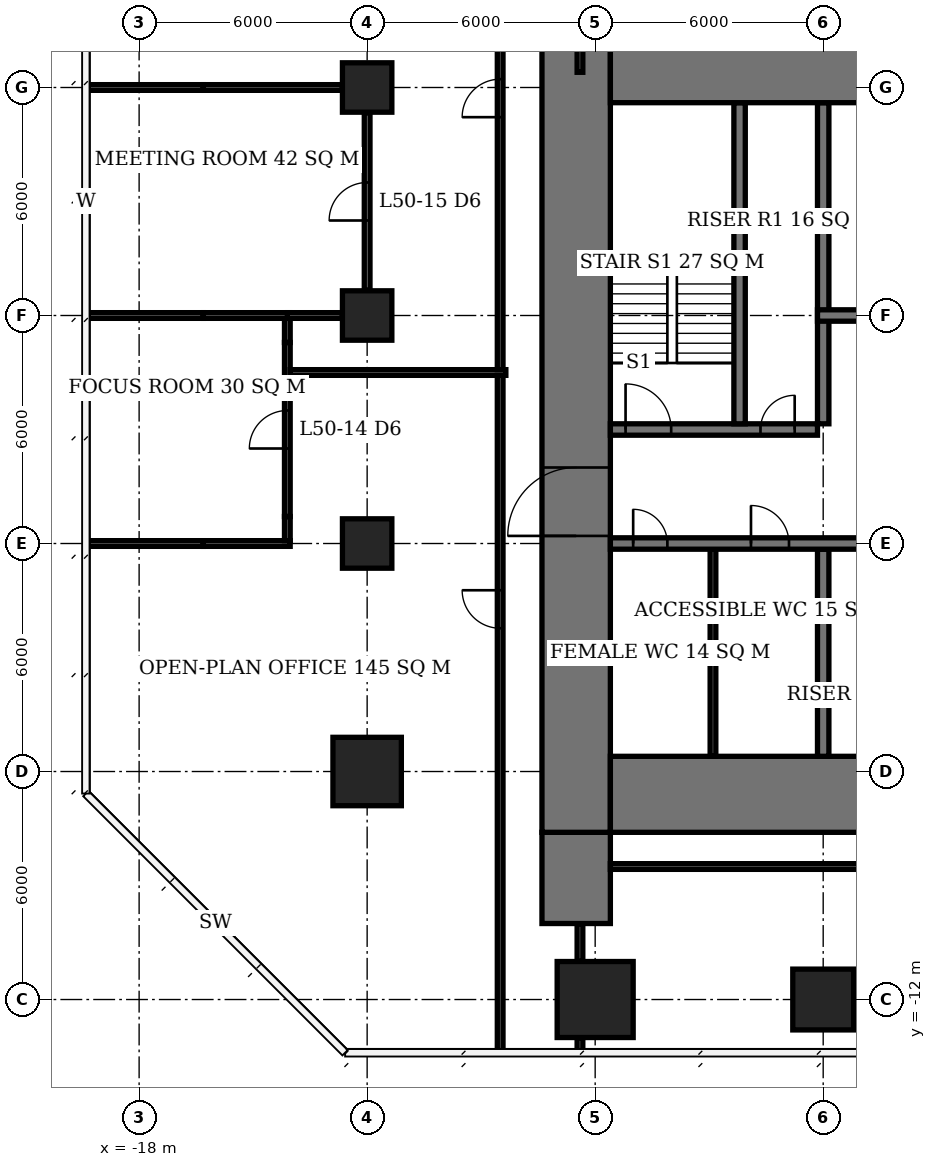
"""IFC4 building model, lengths in metres.
Left out: names, types, materials, properties, quantities, classifications, styles, units other than length and angle.
Written with IfcOpenShell. Run it as: python <this file> out.ifc"""

import sys

from ifc_helpers import new_model, si_unit, direction, frame, frame_2d, origin, origin_2d, place, context, subcontext, project, spatial, rectangle, extrude, element, fill, save


model = new_model("IFC4")
c1 = context("Model", 3, precision=1e-05, world=origin(), true_north=direction((0.0, 1.0)))
c2 = subcontext(c1, "Body", "Model", "MODEL_VIEW")
j1 = project(units=[si_unit("LENGTHUNIT", "METRE"), si_unit("PLANEANGLEUNIT", "RADIAN")], contexts=[c1])
p1 = place(None, origin())
s1 = spatial("IfcSite", under=j1, at=p1, CompositionType="ELEMENT")
p2 = place(p1, origin())
s2 = spatial("IfcBuilding", under=s1, at=p2, CompositionType="ELEMENT")
p3 = place(p2, frame((0.0, 0.0, 204.5)))
s3 = spatial("IfcBuildingStorey", under=s2, at=p3, CompositionType="ELEMENT", Elevation=204.5)
p4 = place(p3, frame((-12.0, -6.0, 0.0), z_axis=(0.0, 0.0, 1.0), x_axis=(1.0, 0.0, 0.0)))
e1 = element("IfcColumn", 1, at=p4, inside=s3, PredefinedType="COLUMN", context=c2, shape_type="SweptSolid", body=[
    extrude(rectangle(XDim=1.8, YDim=1.8, at=origin_2d()), origin(), (0.0, 0.0, 1.0), 3.9),
])
for number, where, z_axis, x_axis in (
    (2, (-12.0, 0.0, 0.0), (0.0, 0.0, 1.0), (1.0, 0.0, 0.0)),
    (3, (-12.0, 6.0, 0.0), (0.0, 0.0, 1.0), (1.0, 0.0, 0.0)),
    (4, (-12.0, 12.0, 0.0), (0.0, 0.0, 1.0), (1.0, 0.0, 0.0)),
):
    element("IfcColumn", number, at=place(p3, frame(where, z_axis=z_axis, x_axis=x_axis)), inside=s3, PredefinedType="COLUMN", context=c2, shape_type="SweptSolid", body=[
        extrude(rectangle(XDim=1.3, YDim=1.3, at=origin_2d()), origin(), (0.0, 0.0, 1.0), 3.9),
    ])
p5 = place(p3, frame((-6.0, -12.0, 0.0), z_axis=(0.0, 0.0, 1.0), x_axis=(1.0, 0.0, 0.0)))
e5 = element("IfcColumn", 5, at=p5, inside=s3, PredefinedType="COLUMN", context=c2, shape_type="SweptSolid", body=[
    extrude(rectangle(XDim=2.0, YDim=2.0, at=origin_2d()), origin(), (0.0, 0.0, 1.0), 3.9),
])
p6 = place(p3, frame((0.0, -12.0, 0.0), z_axis=(0.0, 0.0, 1.0), x_axis=(1.0, 0.0, 0.0)))
e6 = element("IfcColumn", 6, at=p6, inside=s3, PredefinedType="COLUMN", context=c2, shape_type="SweptSolid", body=[
    extrude(rectangle(XDim=1.6, YDim=1.6, at=origin_2d()), origin(), (0.0, 0.0, 1.0), 3.9),
])
for number, where, z_axis, x_axis in (
    (7, (-5.6, -6.6, 0.0), (0.0, 0.0, 1.0), (1.0, 0.0, 0.0)),
    (8, (-5.6, 12.6, 0.0), (0.0, 0.0, 1.0), (1.0, 0.0, 0.0)),
):
    element("IfcWall", number, at=place(p3, frame(where, z_axis=z_axis, x_axis=x_axis)), inside=s3, PredefinedType="SHEAR", context=c2, shape_type="SweptSolid", body=[
        extrude(rectangle(XDim=23.2, YDim=2.0, at=frame_2d((11.6, 0.0))), origin(), (0.0, 0.0, 1.0), 3.9),
    ])
p7 = place(p3, frame((-6.5, -7.6, 0.0), z_axis=(0.0, 0.0, 1.0), x_axis=(0.0, 1.0, 0.0)))
e9 = element("IfcWall", 9, at=p7, inside=s3, PredefinedType="SHEAR", context=c2, shape_type="SweptSolid", body=[
    extrude(rectangle(XDim=21.2, YDim=1.8, at=frame_2d((10.6, 0.0))), origin(), (0.0, 0.0, 1.0), 3.9),
])
p8 = place(p7, frame((7.8, 0.0, 0.0)))
e10 = element("IfcOpeningElement", 10, at=p8, cuts=e9, PredefinedType="OPENING", context=c2, shape_type="SweptSolid", body=[
    extrude(rectangle(XDim=1.8, YDim=2.4, at=frame_2d((0.9, 1.2))), frame((0.0, 0.91, 0.0), z_axis=(0.0, -1.0, 0.0), x_axis=(1.0, 0.0, 0.0)), (0.0, 0.0, 1.0), 1.82),
])
p9 = place(p3, frame((-6.5, -10.0, 0.0), z_axis=(0.0, 0.0, 1.0), x_axis=(0.0, 1.0, 0.0)))
e11 = element("IfcWall", 11, at=p9, inside=s3, PredefinedType="SHEAR", context=c2, shape_type="SweptSolid", body=[
    extrude(rectangle(XDim=2.4, YDim=1.8, at=frame_2d((1.2, 0.0))), origin(), (0.0, 0.0, 1.0), 3.9),
])
p10 = place(p3, frame((-5.6, 0.0, 0.0), z_axis=(0.0, 0.0, 1.0), x_axis=(1.0, 0.0, 0.0)))
e12 = element("IfcWall", 12, at=p10, inside=s3, PredefinedType="SHEAR", context=c2, shape_type="SweptSolid", body=[
    extrude(rectangle(XDim=17.75, YDim=0.3, at=frame_2d((8.875, 0.0))), origin(), (0.0, 0.0, 1.0), 3.9),
])
p11 = place(p10, frame((0.6, 0.0, 0.0)))
e13 = element("IfcOpeningElement", 13, at=p11, cuts=e12, PredefinedType="OPENING", context=c2, shape_type="SweptSolid", body=[
    extrude(rectangle(XDim=0.9, YDim=2.1, at=frame_2d((0.45, 1.05))), frame((0.0, 0.16, 0.0), z_axis=(0.0, -1.0, 0.0), x_axis=(1.0, 0.0, 0.0)), (0.0, 0.0, 1.0), 0.32),
])
p12 = place(p10, frame((3.7, 0.0, 0.0)))
e14 = element("IfcOpeningElement", 14, at=p12, cuts=e12, PredefinedType="OPENING", context=c2, shape_type="SweptSolid", body=[
    extrude(rectangle(XDim=1.0, YDim=2.1, at=frame_2d((0.5, 1.05))), frame((0.0, 0.16, 0.0), z_axis=(0.0, -1.0, 0.0), x_axis=(1.0, 0.0, 0.0)), (0.0, 0.0, 1.0), 0.32),
])
p13 = place(p10, frame((9.6, 0.0, 0.0)))
e15 = element("IfcOpeningElement", 15, at=p13, cuts=e12, PredefinedType="OPENING", context=c2, shape_type="SweptSolid", body=[
    extrude(rectangle(XDim=1.0, YDim=2.1, at=frame_2d((0.5, 1.05))), frame((0.0, 0.16, 0.0), z_axis=(0.0, -1.0, 0.0), x_axis=(1.0, 0.0, 0.0)), (0.0, 0.0, 1.0), 0.32),
])
p14 = place(p10, frame((12.55, 0.0, 0.0)))
e16 = element("IfcOpeningElement", 16, at=p14, cuts=e12, PredefinedType="OPENING", context=c2, shape_type="SweptSolid", body=[
    extrude(rectangle(XDim=1.1, YDim=2.1, at=frame_2d((0.55, 1.05))), frame((0.0, 0.16, 0.0), z_axis=(0.0, -1.0, 0.0), x_axis=(1.0, 0.0, 0.0)), (0.0, 0.0, 1.0), 0.32),
])
p15 = place(p10, frame((15.55, 0.0, 0.0)))
e17 = element("IfcOpeningElement", 17, at=p15, cuts=e12, PredefinedType="OPENING", context=c2, shape_type="SweptSolid", body=[
    extrude(rectangle(XDim=1.1, YDim=2.1, at=frame_2d((0.55, 1.05))), frame((0.0, 0.16, 0.0), z_axis=(0.0, -1.0, 0.0), x_axis=(1.0, 0.0, 0.0)), (0.0, 0.0, 1.0), 0.32),
])
p16 = place(p3, frame((-5.6, 3.0, 0.0), z_axis=(0.0, 0.0, 1.0), x_axis=(1.0, 0.0, 0.0)))
e18 = element("IfcWall", 18, at=p16, inside=s3, PredefinedType="SHEAR", context=c2, shape_type="SweptSolid", body=[
    extrude(rectangle(XDim=5.45, YDim=0.3, at=frame_2d((2.725, 0.0))), origin(), (0.0, 0.0, 1.0), 3.9),
])
p17 = place(p16, frame((0.4, 0.0, 0.0)))
e19 = element("IfcOpeningElement", 19, at=p17, cuts=e18, PredefinedType="OPENING", context=c2, shape_type="SweptSolid", body=[
    extrude(rectangle(XDim=1.2, YDim=2.1, at=frame_2d((0.6, 1.05))), frame((0.0, 0.16, 0.0), z_axis=(0.0, -1.0, 0.0), x_axis=(1.0, 0.0, 0.0)), (0.0, 0.0, 1.0), 0.32),
])
p18 = place(p16, frame((3.95, 0.0, 0.0)))
e20 = element("IfcOpeningElement", 20, at=p18, cuts=e18, PredefinedType="OPENING", context=c2, shape_type="SweptSolid", body=[
    extrude(rectangle(XDim=0.9, YDim=2.1, at=frame_2d((0.45, 1.05))), frame((0.0, 0.16, 0.0), z_axis=(0.0, -1.0, 0.0), x_axis=(1.0, 0.0, 0.0)), (0.0, 0.0, 1.0), 0.32),
])
p19 = place(p3, frame((-0.15, 6.0, 0.0), z_axis=(0.0, 0.0, 1.0), x_axis=(1.0, 0.0, 0.0)))
e21 = element("IfcWall", 21, at=p19, inside=s3, PredefinedType="SHEAR", context=c2, shape_type="SweptSolid", body=[
    extrude(rectangle(XDim=17.75, YDim=0.3, at=frame_2d((8.875, 0.0))), origin(), (0.0, 0.0, 1.0), 3.9),
])
p20 = place(p19, frame((13.15, 0.0, 0.0)))
e22 = element("IfcOpeningElement", 22, at=p20, cuts=e21, PredefinedType="OPENING", context=c2, shape_type="SweptSolid", body=[
    extrude(rectangle(XDim=0.9, YDim=2.1, at=frame_2d((0.45, 1.05))), frame((0.0, 0.16, 0.0), z_axis=(0.0, -1.0, 0.0), x_axis=(1.0, 0.0, 0.0)), (0.0, 0.0, 1.0), 0.32),
])
p21 = place(p19, frame((7.25, 0.0, 0.0)))
e23 = element("IfcOpeningElement", 23, at=p21, cuts=e21, PredefinedType="OPENING", context=c2, shape_type="SweptSolid", body=[
    extrude(rectangle(XDim=1.0, YDim=2.1, at=frame_2d((0.5, 1.05))), frame((0.0, 0.16, 0.0), z_axis=(0.0, -1.0, 0.0), x_axis=(1.0, 0.0, 0.0)), (0.0, 0.0, 1.0), 0.32),
])
p22 = place(p19, frame((1.1, 0.0, 0.0)))
e24 = element("IfcOpeningElement", 24, at=p22, cuts=e21, PredefinedType="OPENING", context=c2, shape_type="SweptSolid", body=[
    extrude(rectangle(XDim=1.1, YDim=2.1, at=frame_2d((0.55, 1.05))), frame((0.0, 0.16, 0.0), z_axis=(0.0, -1.0, 0.0), x_axis=(1.0, 0.0, 0.0)), (0.0, 0.0, 1.0), 0.32),
])
p23 = place(p19, frame((4.1, 0.0, 0.0)))
e25 = element("IfcOpeningElement", 25, at=p23, cuts=e21, PredefinedType="OPENING", context=c2, shape_type="SweptSolid", body=[
    extrude(rectangle(XDim=1.1, YDim=2.1, at=frame_2d((0.55, 1.05))), frame((0.0, 0.16, 0.0), z_axis=(0.0, -1.0, 0.0), x_axis=(1.0, 0.0, 0.0)), (0.0, 0.0, 1.0), 0.32),
])
p24 = place(p3, frame((0.0, -5.6, 0.0), z_axis=(0.0, 0.0, 1.0), x_axis=(0.0, 1.0, 0.0)))
e26 = element("IfcWall", 26, at=p24, inside=s3, PredefinedType="SHEAR", context=c2, shape_type="SweptSolid", body=[
    extrude(rectangle(XDim=5.45, YDim=0.3, at=frame_2d((2.725, 0.0))), origin(), (0.0, 0.0, 1.0), 3.9),
])
for number, where, z_axis, x_axis in (
    (27, (0.0, 3.15, 0.0), (0.0, 0.0, 1.0), (0.0, 1.0, 0.0)),
    (28, (-2.2, 3.15, 0.0), (0.0, 0.0, 1.0), (0.0, 1.0, 0.0)),
):
    element("IfcWall", number, at=place(p3, frame(where, z_axis=z_axis, x_axis=x_axis)), inside=s3, PredefinedType="SHEAR", context=c2, shape_type="SweptSolid", body=[
        extrude(rectangle(XDim=8.45, YDim=0.3, at=frame_2d((4.225, 0.0))), origin(), (0.0, 0.0, 1.0), 3.9),
    ])
p25 = place(p3, frame((-2.9, -5.6, 0.0), z_axis=(0.0, 0.0, 1.0), x_axis=(0.0, 1.0, 0.0)))
e29 = element("IfcWall", 29, at=p25, inside=s3, PredefinedType="PLUMBINGWALL", context=c2, shape_type="SweptSolid", body=[
    extrude(rectangle(XDim=5.45, YDim=0.15, at=frame_2d((2.725, 0.0))), origin(), (0.0, 0.0, 1.0), 3.65),
])
p26 = place(p3, frame((-19.4, 0.0, 0.0), z_axis=(0.0, 0.0, 1.0), x_axis=(1.0, 0.0, 0.0)))
e30 = element("IfcWall", 30, at=p26, inside=s3, PredefinedType="PARTITIONING", context=c2, shape_type="SweptSolid", body=[
    extrude(rectangle(XDim=3.09, YDim=0.15, at=frame_2d((1.545, 0.0))), origin(), (0.0, 0.0, 1.0), 3.65),
])
p27 = place(p3, frame((-16.31, 0.0, 0.0), z_axis=(0.0, 0.0, 1.0), x_axis=(1.0, 0.0, 0.0)))
e31 = element("IfcWall", 31, at=p27, inside=s3, PredefinedType="PARTITIONING", context=c2, shape_type="SweptSolid", body=[
    extrude(rectangle(XDim=2.285, YDim=0.15, at=frame_2d((1.143, 0.0))), origin(), (0.0, 0.0, 1.0), 2.65),
])
p28 = place(p3, frame((-19.35, 6.0, 0.0), z_axis=(0.0, 0.0, 1.0), x_axis=(1.0, 0.0, 0.0)))
e32 = element("IfcWall", 32, at=p28, inside=s3, PredefinedType="PARTITIONING", context=c2, shape_type="SweptSolid", body=[
    extrude(rectangle(XDim=3.04, YDim=0.15, at=frame_2d((1.52, 0.0))), origin(), (0.0, 0.0, 1.0), 3.65),
])
p29 = place(p3, frame((-16.31, 6.0, 0.0), z_axis=(0.0, 0.0, 1.0), x_axis=(1.0, 0.0, 0.0)))
e33 = element("IfcWall", 33, at=p29, inside=s3, PredefinedType="PARTITIONING", context=c2, shape_type="SweptSolid", body=[
    extrude(rectangle(XDim=2.285, YDim=0.15, at=frame_2d((1.143, 0.0))), origin(), (0.0, 0.0, 1.0), 2.65),
])
p30 = place(p3, frame((-14.1, 6.0, 0.0), z_axis=(0.0, 0.0, 1.0), x_axis=(1.0, 0.0, 0.0)))
e34 = element("IfcWall", 34, at=p30, inside=s3, PredefinedType="PARTITIONING", context=c2, shape_type="SweptSolid", body=[
    extrude(rectangle(XDim=1.45, YDim=0.15, at=frame_2d((0.725, 0.0))), origin(), (0.0, 0.0, 1.0), 2.65),
])
p31 = place(p3, frame((-19.35, 12.0, 0.0), z_axis=(0.0, 0.0, 1.0), x_axis=(1.0, 0.0, 0.0)))
e35 = element("IfcWall", 35, at=p31, inside=s3, PredefinedType="PARTITIONING", context=c2, shape_type="SweptSolid", body=[
    extrude(rectangle(XDim=3.04, YDim=0.15, at=frame_2d((1.52, 0.0))), origin(), (0.0, 0.0, 1.0), 3.65),
])
p32 = place(p3, frame((-16.31, 12.0, 0.0), z_axis=(0.0, 0.0, 1.0), x_axis=(1.0, 0.0, 0.0)))
e36 = element("IfcWall", 36, at=p32, inside=s3, PredefinedType="PARTITIONING", context=c2, shape_type="SweptSolid", body=[
    extrude(rectangle(XDim=3.66, YDim=0.15, at=frame_2d((1.83, 0.0))), origin(), (0.0, 0.0, 1.0), 2.65),
])
p33 = place(p3, frame((-14.1, 0.075, 0.0), z_axis=(0.0, 0.0, 1.0), x_axis=(0.0, 1.0, 0.0)))
e37 = element("IfcWall", 37, at=p33, inside=s3, PredefinedType="PARTITIONING", context=c2, shape_type="SweptSolid", body=[
    extrude(rectangle(XDim=0.635, YDim=0.15, at=frame_2d((0.317, 0.0))), origin(), (0.0, 0.0, 1.0), 2.65),
])
p34 = place(p3, frame((-14.1, 0.71, 0.0), z_axis=(0.0, 0.0, 1.0), x_axis=(0.0, 1.0, 0.0)))
e38 = element("IfcWall", 38, at=p34, inside=s3, PredefinedType="PARTITIONING", context=c2, shape_type="SweptSolid", body=[
    extrude(rectangle(XDim=4.58, YDim=0.15, at=frame_2d((2.29, 0.0))), origin(), (0.0, 0.0, 1.0), 3.65),
])
p35 = place(p34, frame((1.79, 0.0, 0.0)))
e39 = element("IfcOpeningElement", 39, at=p35, cuts=e38, PredefinedType="OPENING", context=c2, shape_type="SweptSolid", body=[
    extrude(rectangle(XDim=1.0, YDim=2.1, at=frame_2d((0.5, 1.05))), frame((0.0, 0.085, 0.0), z_axis=(0.0, -1.0, 0.0), x_axis=(1.0, 0.0, 0.0)), (0.0, 0.0, 1.0), 0.17),
])
p36 = place(p3, frame((-14.1, 5.29, 0.0), z_axis=(0.0, 0.0, 1.0), x_axis=(0.0, 1.0, 0.0)))
e40 = element("IfcWall", 40, at=p36, inside=s3, PredefinedType="PARTITIONING", context=c2, shape_type="SweptSolid", body=[
    extrude(rectangle(XDim=0.635, YDim=0.15, at=frame_2d((0.317, 0.0))), origin(), (0.0, 0.0, 1.0), 2.65),
])
p37 = place(p3, frame((-12.0, 6.66, 0.0), z_axis=(0.0, 0.0, 1.0), x_axis=(0.0, 1.0, 0.0)))
e41 = element("IfcWall", 41, at=p37, inside=s3, PredefinedType="PARTITIONING", context=c2, shape_type="SweptSolid", body=[
    extrude(rectangle(XDim=4.68, YDim=0.15, at=frame_2d((2.34, 0.0))), origin(), (0.0, 0.0, 1.0), 3.65),
])
p38 = place(p37, frame((1.84, 0.0, 0.0)))
e42 = element("IfcOpeningElement", 42, at=p38, cuts=e41, PredefinedType="OPENING", context=c2, shape_type="SweptSolid", body=[
    extrude(rectangle(XDim=1.0, YDim=2.1, at=frame_2d((0.5, 1.05))), frame((0.0, 0.085, 0.0), z_axis=(0.0, -1.0, 0.0), x_axis=(1.0, 0.0, 0.0)), (0.0, 0.0, 1.0), 0.17),
])
p39 = place(p3, frame((-14.025, 4.5, 0.0), z_axis=(0.0, 0.0, 1.0), x_axis=(1.0, 0.0, 0.0)))
e43 = element("IfcWall", 43, at=p39, inside=s3, PredefinedType="PARTITIONING", context=c2, shape_type="SweptSolid", body=[
    extrude(rectangle(XDim=5.675, YDim=0.15, at=frame_2d((2.837, 0.0))), origin(), (0.0, 0.0, 1.0), 3.65),
])
p40 = place(p3, frame((-8.5, -13.4, 0.0), z_axis=(0.0, 0.0, 1.0), x_axis=(0.0, 1.0, 0.0)))
e44 = element("IfcWall", 44, at=p40, inside=s3, PredefinedType="PARTITIONING", context=c2, shape_type="SweptSolid", body=[
    extrude(rectangle(XDim=17.825, YDim=0.15, at=frame_2d((8.913, 0.0))), origin(), (0.0, 0.0, 1.0), 3.65),
])
p41 = place(p40, frame((11.17, 0.0, 0.0)))
e45 = element("IfcOpeningElement", 45, at=p41, cuts=e44, PredefinedType="OPENING", context=c2, shape_type="SweptSolid", body=[
    extrude(rectangle(XDim=1.0, YDim=2.1, at=frame_2d((0.5, 1.05))), frame((0.0, 0.085, 0.0), z_axis=(0.0, -1.0, 0.0), x_axis=(1.0, 0.0, 0.0)), (0.0, 0.0, 1.0), 0.17),
])
p42 = place(p3, frame((-8.5, 4.575, 0.0), z_axis=(0.0, 0.0, 1.0), x_axis=(0.0, 1.0, 0.0)))
e46 = element("IfcWall", 46, at=p42, inside=s3, PredefinedType="PARTITIONING", context=c2, shape_type="SweptSolid", body=[
    extrude(rectangle(XDim=20.55, YDim=0.15, at=frame_2d((10.275, 0.0))), origin(), (0.0, 0.0, 1.0), 3.65),
])
p43 = place(p42, frame((6.644, 0.0, 0.0)))
e47 = element("IfcOpeningElement", 47, at=p43, cuts=e46, PredefinedType="OPENING", context=c2, shape_type="SweptSolid", body=[
    extrude(rectangle(XDim=1.0, YDim=2.1, at=frame_2d((0.5, 1.05))), frame((0.0, 0.085, 0.0), z_axis=(0.0, -1.0, 0.0), x_axis=(1.0, 0.0, 0.0)), (0.0, 0.0, 1.0), 0.17),
])
p44 = place(p3, frame((-6.4, -13.35, 0.0), z_axis=(0.0, 0.0, 1.0), x_axis=(0.0, 1.0, 0.0)))
e48 = element("IfcWall", 48, at=p44, inside=s3, PredefinedType="PARTITIONING", context=c2, shape_type="SweptSolid", body=[
    extrude(rectangle(XDim=0.35, YDim=0.15, at=frame_2d((0.175, 0.0))), origin(), (0.0, 0.0, 1.0), 3.65),
])
p45 = place(p3, frame((-6.4, -11.0, 0.0), z_axis=(0.0, 0.0, 1.0), x_axis=(0.0, 1.0, 0.0)))
e49 = element("IfcWall", 49, at=p45, inside=s3, PredefinedType="PARTITIONING", context=c2, shape_type="SweptSolid", body=[
    extrude(rectangle(XDim=1.0, YDim=0.15, at=frame_2d((0.5, 0.0))), origin(), (0.0, 0.0, 1.0), 3.65),
])
p46 = place(p3, frame((-6.4, 12.4, 0.0), z_axis=(0.0, 0.0, 1.0), x_axis=(0.0, 1.0, 0.0)))
e50 = element("IfcWall", 50, at=p46, inside=s3, PredefinedType="PARTITIONING", context=c2, shape_type="SweptSolid", body=[
    extrude(rectangle(XDim=1.2, YDim=0.15, at=frame_2d((0.6, 0.0))), origin(), (0.0, 0.0, 1.0), 3.65),
])
p47 = place(p3, frame((17.6, -8.5, 0.0), z_axis=(0.0, 0.0, 1.0), x_axis=(-1.0, 0.0, 0.0)))
e51 = element("IfcWall", 51, at=p47, inside=s3, PredefinedType="PARTITIONING", context=c2, shape_type="SweptSolid", body=[
    extrude(rectangle(XDim=23.2, YDim=0.15, at=frame_2d((11.6, 0.0))), origin(), (0.0, 0.0, 1.0), 3.65),
])
p48 = place(p47, frame((14.58, 0.0, 0.0)))
e52 = element("IfcOpeningElement", 52, at=p48, cuts=e51, PredefinedType="OPENING", context=c2, shape_type="SweptSolid", body=[
    extrude(rectangle(XDim=1.0, YDim=2.1, at=frame_2d((0.5, 1.05))), frame((0.0, 0.085, 0.0), z_axis=(0.0, -1.0, 0.0), x_axis=(1.0, 0.0, 0.0)), (0.0, 0.0, 1.0), 0.17),
])
p49 = place(p8, origin())
e53 = element("IfcDoor", 53, at=p49, inside=s3, OperationType="DOUBLE_DOOR_SINGLE_SWING", PredefinedType="DOOR", context=c2, shape_type="SweptSolid", body=[
    extrude(rectangle(XDim=1.8, YDim=2.4, at=frame_2d((0.9, 1.2))), frame((0.0, 0.025, 0.0), z_axis=(0.0, -1.0, 0.0), x_axis=(1.0, 0.0, 0.0)), (0.0, 0.0, 1.0), 0.05),
])
fill(e10, e53)
p50 = place(p17, origin())
e54 = element("IfcDoor", 54, at=p50, inside=s3, OperationType="SINGLE_SWING_LEFT", PredefinedType="DOOR", context=c2, shape_type="SweptSolid", body=[
    extrude(rectangle(XDim=1.2, YDim=2.1, at=frame_2d((0.6, 1.05))), frame((0.0, 0.025, 0.0), z_axis=(0.0, -1.0, 0.0), x_axis=(1.0, 0.0, 0.0)), (0.0, 0.0, 1.0), 0.05),
])
fill(e19, e54)
p51 = place(p18, origin())
e55 = element("IfcDoor", 55, at=p51, inside=s3, OperationType="SINGLE_SWING_RIGHT", PredefinedType="DOOR", context=c2, shape_type="SweptSolid", body=[
    extrude(rectangle(XDim=0.9, YDim=2.1, at=frame_2d((0.45, 1.05))), frame((0.0, 0.025, 0.0), z_axis=(0.0, -1.0, 0.0), x_axis=(1.0, 0.0, 0.0)), (0.0, 0.0, 1.0), 0.05),
])
fill(e20, e55)
p52 = place(p11, origin())
e56 = element("IfcDoor", 56, at=p52, inside=s3, OperationType="SINGLE_SWING_LEFT", PredefinedType="DOOR", context=c2, shape_type="SweptSolid", body=[
    extrude(rectangle(XDim=0.9, YDim=2.1, at=frame_2d((0.45, 1.05))), frame((0.0, 0.025, 0.0), z_axis=(0.0, -1.0, 0.0), x_axis=(1.0, 0.0, 0.0)), (0.0, 0.0, 1.0), 0.05),
])
fill(e13, e56)
p53 = place(p12, origin())
e57 = element("IfcDoor", 57, at=p53, inside=s3, OperationType="SINGLE_SWING_LEFT", PredefinedType="DOOR", context=c2, shape_type="SweptSolid", body=[
    extrude(rectangle(XDim=1.0, YDim=2.1, at=frame_2d((0.5, 1.05))), frame((0.0, 0.025, 0.0), z_axis=(0.0, -1.0, 0.0), x_axis=(1.0, 0.0, 0.0)), (0.0, 0.0, 1.0), 0.05),
])
fill(e14, e57)
p54 = place(p35, origin())
e58 = element("IfcDoor", 58, at=p54, inside=s3, OperationType="SINGLE_SWING_LEFT", PredefinedType="DOOR", context=c2, shape_type="SweptSolid", body=[
    extrude(rectangle(XDim=1.0, YDim=2.1, at=frame_2d((0.5, 1.05))), frame((0.0, 0.025, 0.0), z_axis=(0.0, -1.0, 0.0), x_axis=(1.0, 0.0, 0.0)), (0.0, 0.0, 1.0), 0.05),
])
fill(e39, e58)
p55 = place(p38, origin())
e59 = element("IfcDoor", 59, at=p55, inside=s3, OperationType="SINGLE_SWING_LEFT", PredefinedType="DOOR", context=c2, shape_type="SweptSolid", body=[
    extrude(rectangle(XDim=1.0, YDim=2.1, at=frame_2d((0.5, 1.05))), frame((0.0, 0.025, 0.0), z_axis=(0.0, -1.0, 0.0), x_axis=(1.0, 0.0, 0.0)), (0.0, 0.0, 1.0), 0.05),
])
fill(e42, e59)
p56 = place(p41, origin())
e60 = element("IfcDoor", 60, at=p56, inside=s3, OperationType="SINGLE_SWING_RIGHT", PredefinedType="DOOR", context=c2, shape_type="SweptSolid", body=[
    extrude(rectangle(XDim=1.0, YDim=2.1, at=frame_2d((0.5, 1.05))), frame((0.0, 0.025, 0.0), z_axis=(0.0, -1.0, 0.0), x_axis=(1.0, 0.0, 0.0)), (0.0, 0.0, 1.0), 0.05),
])
fill(e45, e60)
p57 = place(p43, origin())
e61 = element("IfcDoor", 61, at=p57, inside=s3, OperationType="SINGLE_SWING_LEFT", PredefinedType="DOOR", context=c2, shape_type="SweptSolid", body=[
    extrude(rectangle(XDim=1.0, YDim=2.1, at=frame_2d((0.5, 1.05))), frame((0.0, 0.025, 0.0), z_axis=(0.0, -1.0, 0.0), x_axis=(1.0, 0.0, 0.0)), (0.0, 0.0, 1.0), 0.05),
])
fill(e47, e61)
save(model, sys.argv[1])
